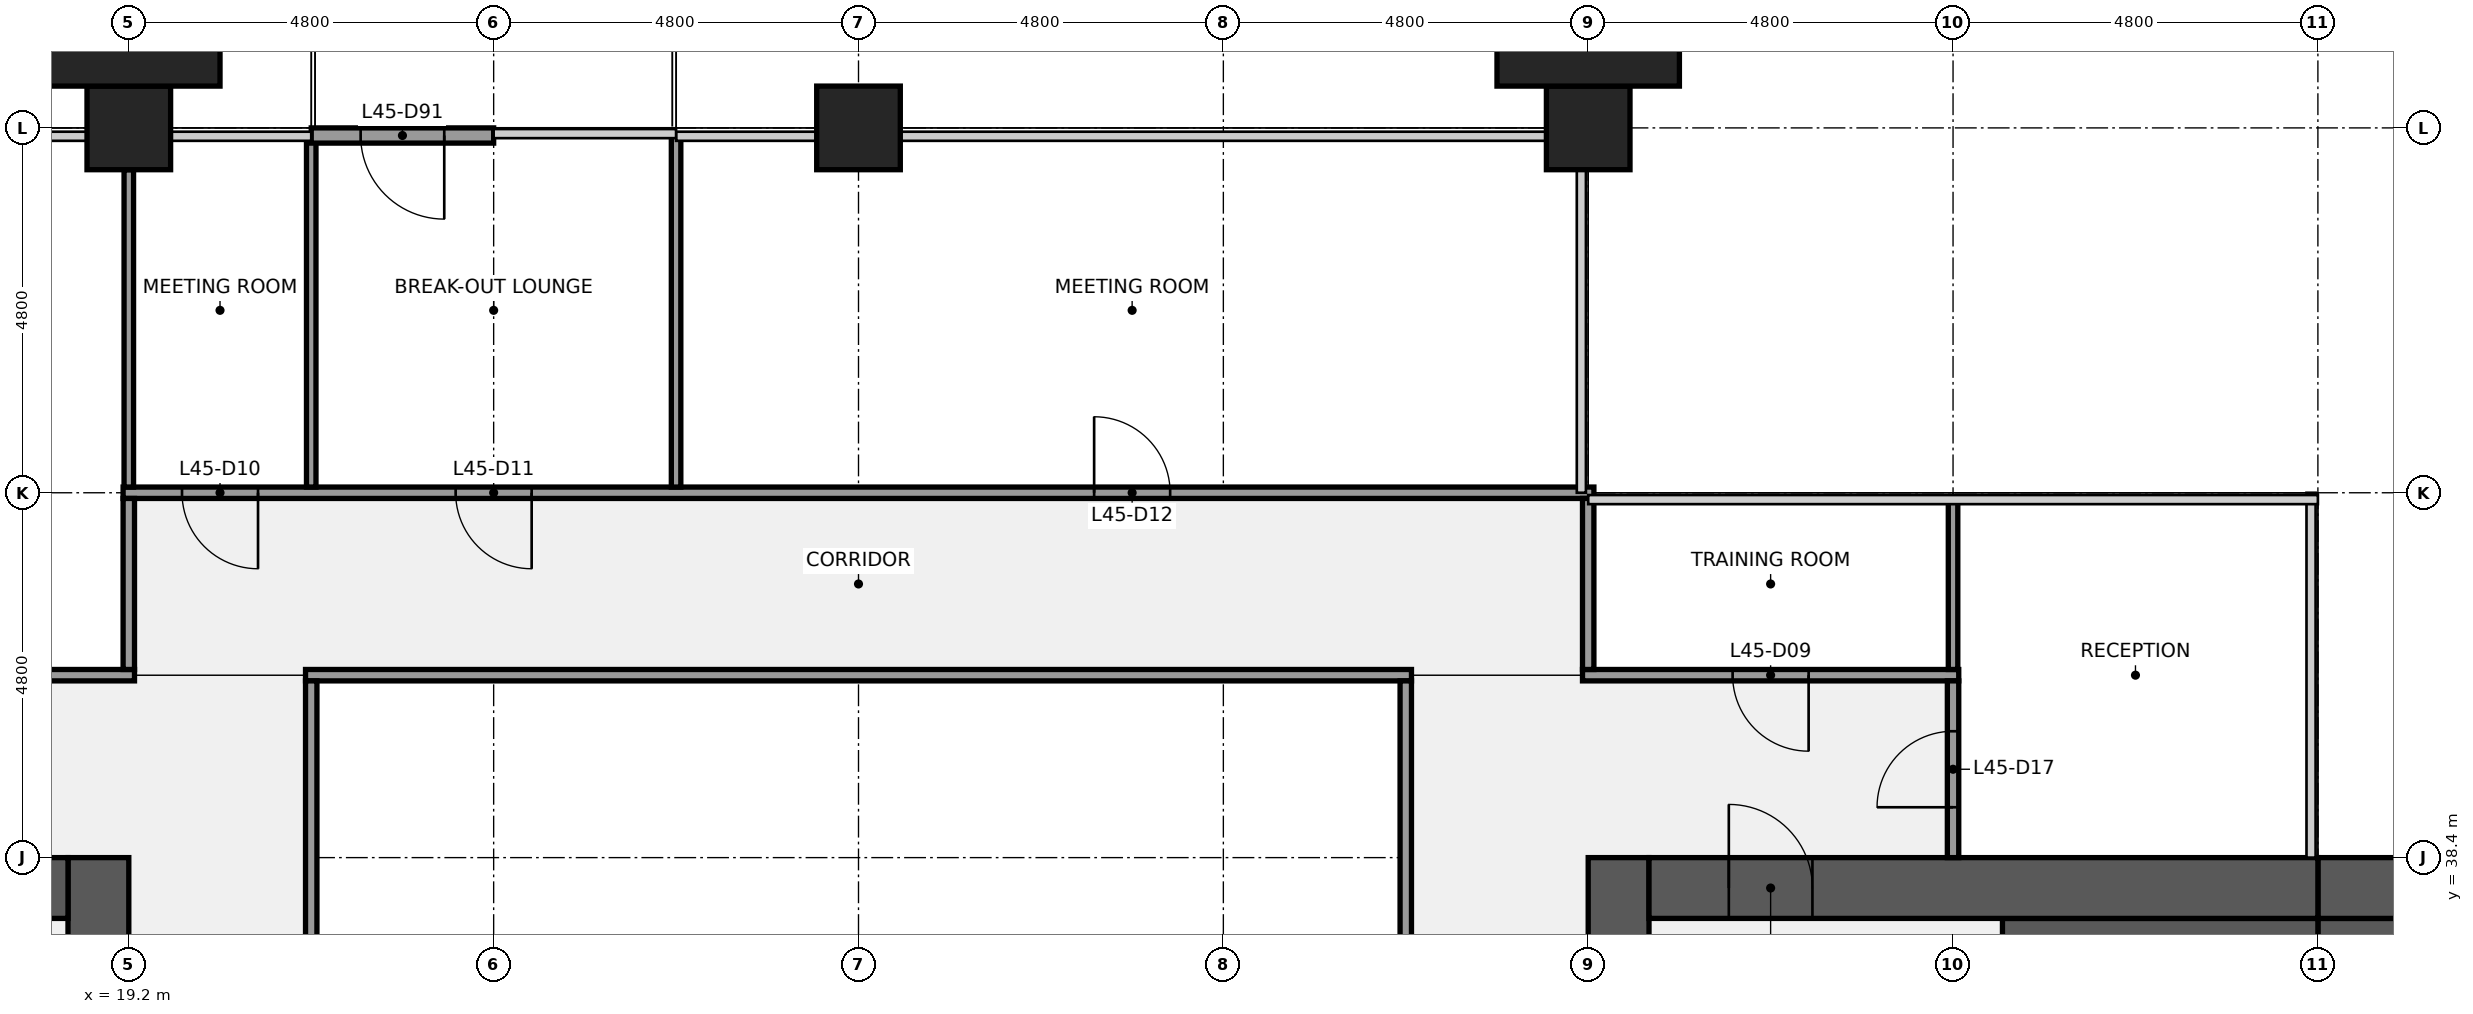
"""IFC4 building model, lengths in metres.
Left out: names, types, materials, properties, quantities, classifications, styles, units other than length and angle.
Written with IfcOpenShell. Run it as: python <this file> out.ifc"""

import sys

from ifc_helpers import new_model, si_unit, direction, frame, frame_2d, origin, origin_2d, place, context, subcontext, project, spatial, rectangle, extrude, element, fill, save


model = new_model("IFC4")
c1 = context("Model", 3, precision=1e-05, world=origin(), true_north=direction((0.0, 1.0)))
c2 = subcontext(c1, "Body", "Model", "MODEL_VIEW")
j1 = project(units=[si_unit("LENGTHUNIT", "METRE"), si_unit("PLANEANGLEUNIT", "RADIAN")], contexts=[c1])
p1 = place(None, origin())
s1 = spatial("IfcSite", under=j1, at=p1, CompositionType="ELEMENT")
p2 = place(p1, origin())
s2 = spatial("IfcBuilding", under=s1, at=p2, CompositionType="ELEMENT")
p3 = place(p2, frame((0.0, 0.0, 209.2)))
s3 = spatial("IfcBuildingStorey", under=s2, at=p3, CompositionType="ELEMENT", Elevation=209.2)
for number, where, z_axis, x_axis in (
    (1, (19.2, 48.0, 0.0), (0.0, 0.0, 1.0), (1.0, 0.0, 0.0)),
    (2, (28.8, 48.0, 0.0), (0.0, 0.0, 1.0), (1.0, 0.0, 0.0)),
    (3, (38.4, 48.0, 0.0), (0.0, 0.0, 1.0), (1.0, 0.0, 0.0)),
):
    element("IfcColumn", number, at=place(p3, frame(where, z_axis=z_axis, x_axis=x_axis)), inside=s3, PredefinedType="COLUMN", context=c2, shape_type="SweptSolid", body=[
        extrude(rectangle(XDim=1.1, YDim=1.1, at=origin_2d()), origin(), (0.0, 0.0, 1.0), 4.0),
    ])
p4 = place(p3, frame((18.8, 38.4, 0.0), z_axis=(0.0, 0.0, 1.0), x_axis=(0.0, -1.0, 0.0)))
e4 = element("IfcWall", 4, at=p4, inside=s3, PredefinedType="SHEAR", context=c2, shape_type="SweptSolid", body=[
    extrude(rectangle(XDim=28.8, YDim=0.8, at=frame_2d((14.4, 0.0))), origin(), (0.0, 0.0, 1.0), 3.84),
])
p5 = place(p4, frame((18.3, 0.0, 0.0)))
e5 = element("IfcOpeningElement", 5, at=p5, cuts=e4, PredefinedType="OPENING", context=c2, shape_type="SweptSolid", body=[
    extrude(rectangle(XDim=1.8, YDim=2.1, at=frame_2d((0.9, 1.05))), frame((0.0, 0.41, 0.0), z_axis=(0.0, -1.0, 0.0), x_axis=(1.0, 0.0, 0.0)), (0.0, 0.0, 1.0), 0.82),
])
p6 = place(p4, frame((8.7, 0.0, 0.0)))
e6 = element("IfcOpeningElement", 6, at=p6, cuts=e4, PredefinedType="OPENING", context=c2, shape_type="SweptSolid", body=[
    extrude(rectangle(XDim=1.8, YDim=2.1, at=frame_2d((0.9, 1.05))), frame((0.0, 0.41, 0.0), z_axis=(0.0, -1.0, 0.0), x_axis=(1.0, 0.0, 0.0)), (0.0, 0.0, 1.0), 0.82),
])
p7 = place(p3, frame((9.6, 38.0, 0.0), z_axis=(0.0, 0.0, 1.0), x_axis=(1.0, 0.0, 0.0)))
e7 = element("IfcWall", 7, at=p7, inside=s3, PredefinedType="SHEAR", context=c2, shape_type="SweptSolid", body=[
    extrude(rectangle(XDim=8.8, YDim=0.8, at=frame_2d((4.4, 0.0))), origin(), (0.0, 0.0, 1.0), 3.84),
])
p8 = place(p7, frame((6.65, 0.0, 0.0)))
e8 = element("IfcOpeningElement", 8, at=p8, cuts=e7, PredefinedType="OPENING", context=c2, shape_type="SweptSolid", body=[
    extrude(rectangle(XDim=1.1, YDim=2.1, at=frame_2d((0.55, 1.05))), frame((0.0, 0.41, 0.0), z_axis=(0.0, -1.0, 0.0), x_axis=(1.0, 0.0, 0.0)), (0.0, 0.0, 1.0), 0.82),
])
p9 = place(p3, frame((38.8, 9.6, 0.0), z_axis=(0.0, 0.0, 1.0), x_axis=(0.0, 1.0, 0.0)))
e9 = element("IfcWall", 9, at=p9, inside=s3, PredefinedType="SHEAR", context=c2, shape_type="SweptSolid", body=[
    extrude(rectangle(XDim=28.8, YDim=0.8, at=frame_2d((14.4, 0.0))), origin(), (0.0, 0.0, 1.0), 3.84),
])
p10 = place(p9, frame((8.7, 0.0, 0.0)))
e10 = element("IfcOpeningElement", 10, at=p10, cuts=e9, PredefinedType="OPENING", context=c2, shape_type="SweptSolid", body=[
    extrude(rectangle(XDim=1.8, YDim=2.1, at=frame_2d((0.9, 1.05))), frame((0.0, 0.41, 0.0), z_axis=(0.0, -1.0, 0.0), x_axis=(1.0, 0.0, 0.0)), (0.0, 0.0, 1.0), 0.82),
])
p11 = place(p9, frame((18.3, 0.0, 0.0)))
e11 = element("IfcOpeningElement", 11, at=p11, cuts=e9, PredefinedType="OPENING", context=c2, shape_type="SweptSolid", body=[
    extrude(rectangle(XDim=1.8, YDim=2.1, at=frame_2d((0.9, 1.05))), frame((0.0, 0.41, 0.0), z_axis=(0.0, -1.0, 0.0), x_axis=(1.0, 0.0, 0.0)), (0.0, 0.0, 1.0), 0.82),
])
p12 = place(p3, frame((48.0, 37.4, 0.0), z_axis=(0.0, 0.0, 1.0), x_axis=(1.0, 0.0, 0.0)))
e12 = element("IfcWall", 12, at=p12, inside=s3, PredefinedType="SHEAR", context=c2, shape_type="SweptSolid", body=[
    extrude(rectangle(XDim=3.35, YDim=0.4, at=frame_2d((1.675, 0.0))), origin(), (0.0, 0.0, 1.0), 3.84),
])
p13 = place(p3, frame((43.85, 37.4, 0.0), z_axis=(0.0, 0.0, 1.0), x_axis=(1.0, 0.0, 0.0)))
e13 = element("IfcWall", 13, at=p13, inside=s3, PredefinedType="SHEAR", context=c2, shape_type="SweptSolid", body=[
    extrude(rectangle(XDim=4.15, YDim=0.4, at=frame_2d((2.075, 0.0))), origin(), (0.0, 0.0, 1.0), 3.84),
])
p14 = place(p3, frame((48.0, 38.0, 0.0), z_axis=(0.0, 0.0, 1.0), x_axis=(1.0, 0.0, 0.0)))
e14 = element("IfcWall", 14, at=p14, inside=s3, PredefinedType="SHEAR", context=c2, shape_type="SweptSolid", body=[
    extrude(rectangle(XDim=8.8, YDim=0.8, at=frame_2d((4.4, 0.0))), origin(), (0.0, 0.0, 1.0), 3.84),
])
p15 = place(p14, frame((1.5, 0.0, 0.9)))
e15 = element("IfcOpeningElement", 15, at=p15, cuts=e14, PredefinedType="OPENING", context=c2, shape_type="SweptSolid", body=[
    extrude(rectangle(XDim=1.8, YDim=1.5, at=frame_2d((0.9, 0.75))), frame((0.0, 0.41, 0.0), z_axis=(0.0, -1.0, 0.0), x_axis=(1.0, 0.0, 0.0)), (0.0, 0.0, 1.0), 0.82),
])
p16 = place(p3, frame((39.2, 38.0, 0.0), z_axis=(0.0, 0.0, 1.0), x_axis=(1.0, 0.0, 0.0)))
e16 = element("IfcWall", 16, at=p16, inside=s3, PredefinedType="SHEAR", context=c2, shape_type="SweptSolid", body=[
    extrude(rectangle(XDim=8.8, YDim=0.8, at=frame_2d((4.4, 0.0))), origin(), (0.0, 0.0, 1.0), 3.84),
])
p17 = place(p16, frame((1.05, 0.0, 0.0)))
e17 = element("IfcOpeningElement", 17, at=p17, cuts=e16, PredefinedType="OPENING", context=c2, shape_type="SweptSolid", body=[
    extrude(rectangle(XDim=1.1, YDim=2.1, at=frame_2d((0.55, 1.05))), frame((0.0, 0.41, 0.0), z_axis=(0.0, -1.0, 0.0), x_axis=(1.0, 0.0, 0.0)), (0.0, 0.0, 1.0), 0.82),
])
p18 = place(p3, frame((14.325, 40.8, 0.0), z_axis=(0.0, 0.0, 1.0), x_axis=(1.0, 0.0, 0.0)))
e18 = element("IfcWall", 18, at=p18, inside=s3, PredefinedType="PARTITIONING", context=c2, shape_type="SweptSolid", body=[
    extrude(rectangle(XDim=4.95, YDim=0.15, at=frame_2d((2.475, 0.0))), origin(), (0.0, 0.0, 1.0), 2.87),
])
p19 = place(p18, frame((1.975, 0.0, 0.0)))
e19 = element("IfcOpeningElement", 19, at=p19, cuts=e18, PredefinedType="OPENING", context=c2, shape_type="SweptSolid", body=[
    extrude(rectangle(XDim=1.0, YDim=2.1, at=frame_2d((0.5, 1.05))), frame((0.0, 0.085, 0.0), z_axis=(0.0, -1.0, 0.0), x_axis=(1.0, 0.0, 0.0)), (0.0, 0.0, 1.0), 0.17),
])
p20 = place(p3, frame((21.525, 40.8, 0.0), z_axis=(0.0, 0.0, 1.0), x_axis=(1.0, 0.0, 0.0)))
e20 = element("IfcWall", 20, at=p20, inside=s3, PredefinedType="PARTITIONING", context=c2, shape_type="SweptSolid", body=[
    extrude(rectangle(XDim=14.55, YDim=0.15, at=frame_2d((7.275, 0.0))), origin(), (0.0, 0.0, 1.0), 2.87),
])
p21 = place(p3, frame((38.325, 40.8, 0.0), z_axis=(0.0, 0.0, 1.0), x_axis=(1.0, 0.0, 0.0)))
e21 = element("IfcWall", 21, at=p21, inside=s3, PredefinedType="PARTITIONING", context=c2, shape_type="SweptSolid", body=[
    extrude(rectangle(XDim=4.95, YDim=0.15, at=frame_2d((2.475, 0.0))), origin(), (0.0, 0.0, 1.0), 2.87),
])
p22 = place(p21, frame((1.975, 0.0, 0.0)))
e22 = element("IfcOpeningElement", 22, at=p22, cuts=e21, PredefinedType="OPENING", context=c2, shape_type="SweptSolid", body=[
    extrude(rectangle(XDim=1.0, YDim=2.1, at=frame_2d((0.5, 1.05))), frame((0.0, 0.085, 0.0), z_axis=(0.0, -1.0, 0.0), x_axis=(1.0, 0.0, 0.0)), (0.0, 0.0, 1.0), 0.17),
])
p23 = place(p3, frame((19.125, 43.2, 0.0), z_axis=(0.0, 0.0, 1.0), x_axis=(1.0, 0.0, 0.0)))
e23 = element("IfcWall", 23, at=p23, inside=s3, PredefinedType="PARTITIONING", context=c2, shape_type="SweptSolid", body=[
    extrude(rectangle(XDim=19.35, YDim=0.15, at=frame_2d((9.675, 0.0))), origin(), (0.0, 0.0, 1.0), 2.87),
])
p24 = place(p23, frame((0.775, 0.0, 0.0)))
e24 = element("IfcOpeningElement", 24, at=p24, cuts=e23, PredefinedType="OPENING", context=c2, shape_type="SweptSolid", body=[
    extrude(rectangle(XDim=1.0, YDim=2.1, at=frame_2d((0.5, 1.05))), frame((0.0, 0.085, 0.0), z_axis=(0.0, -1.0, 0.0), x_axis=(1.0, 0.0, 0.0)), (0.0, 0.0, 1.0), 0.17),
])
p25 = place(p23, frame((4.375, 0.0, 0.0)))
e25 = element("IfcOpeningElement", 25, at=p25, cuts=e23, PredefinedType="OPENING", context=c2, shape_type="SweptSolid", body=[
    extrude(rectangle(XDim=1.0, YDim=2.1, at=frame_2d((0.5, 1.05))), frame((0.0, 0.085, 0.0), z_axis=(0.0, -1.0, 0.0), x_axis=(1.0, 0.0, 0.0)), (0.0, 0.0, 1.0), 0.17),
])
p26 = place(p23, frame((12.775, 0.0, 0.0)))
e26 = element("IfcOpeningElement", 26, at=p26, cuts=e23, PredefinedType="OPENING", context=c2, shape_type="SweptSolid", body=[
    extrude(rectangle(XDim=1.0, YDim=2.1, at=frame_2d((0.5, 1.05))), frame((0.0, 0.085, 0.0), z_axis=(0.0, -1.0, 0.0), x_axis=(1.0, 0.0, 0.0)), (0.0, 0.0, 1.0), 0.17),
])
p27 = place(p3, frame((19.2, 43.275, 0.0), z_axis=(0.0, 0.0, 1.0), x_axis=(0.0, 1.0, 0.0)))
e27 = element("IfcWall", 27, at=p27, inside=s3, PredefinedType="PARTITIONING", context=c2, shape_type="SweptSolid", body=[
    extrude(rectangle(XDim=4.175, YDim=0.125, at=frame_2d((2.087, 0.0))), origin(), (0.0, 0.0, 1.0), 2.87),
])
p28 = place(p3, frame((19.2, 40.875, 0.0), z_axis=(0.0, 0.0, 1.0), x_axis=(0.0, 1.0, 0.0)))
e28 = element("IfcWall", 28, at=p28, inside=s3, PredefinedType="PARTITIONING", context=c2, shape_type="SweptSolid", body=[
    extrude(rectangle(XDim=2.25, YDim=0.15, at=frame_2d((1.125, 0.0))), origin(), (0.0, 0.0, 1.0), 2.87),
])
p29 = place(p3, frame((21.6, 43.275, 0.0), z_axis=(0.0, 0.0, 1.0), x_axis=(0.0, 1.0, 0.0)))
e29 = element("IfcWall", 29, at=p29, inside=s3, PredefinedType="PARTITIONING", context=c2, shape_type="SweptSolid", body=[
    extrude(rectangle(XDim=4.625, YDim=0.125, at=frame_2d((2.312, 0.0))), origin(), (0.0, 0.0, 1.0), 2.87),
])
p30 = place(p3, frame((21.6, 21.663, 0.0), z_axis=(0.0, 0.0, 1.0), x_axis=(0.0, 1.0, 0.0)))
e30 = element("IfcWall", 30, at=p30, inside=s3, PredefinedType="PARTITIONING", context=c2, shape_type="SweptSolid", body=[
    extrude(rectangle(XDim=19.062, YDim=0.15, at=frame_2d((9.531, 0.0))), origin(), (0.0, 0.0, 1.0), 2.87),
])
p31 = place(p30, frame((9.031, 0.0, 0.0)))
e31 = element("IfcOpeningElement", 31, at=p31, cuts=e30, PredefinedType="OPENING", context=c2, shape_type="SweptSolid", body=[
    extrude(rectangle(XDim=1.0, YDim=2.1, at=frame_2d((0.5, 1.05))), frame((0.0, 0.085, 0.0), z_axis=(0.0, -1.0, 0.0), x_axis=(1.0, 0.0, 0.0)), (0.0, 0.0, 1.0), 0.17),
])
p32 = place(p3, frame((26.4, 43.275, 0.0), z_axis=(0.0, 0.0, 1.0), x_axis=(0.0, 1.0, 0.0)))
e32 = element("IfcWall", 32, at=p32, inside=s3, PredefinedType="PARTITIONING", context=c2, shape_type="SweptSolid", body=[
    extrude(rectangle(XDim=4.625, YDim=0.125, at=frame_2d((2.312, 0.0))), origin(), (0.0, 0.0, 1.0), 2.87),
])
p33 = place(p3, frame((36.0, 21.663, 0.0), z_axis=(0.0, 0.0, 1.0), x_axis=(0.0, 1.0, 0.0)))
e33 = element("IfcWall", 33, at=p33, inside=s3, PredefinedType="PARTITIONING", context=c2, shape_type="SweptSolid", body=[
    extrude(rectangle(XDim=19.062, YDim=0.15, at=frame_2d((9.531, 0.0))), origin(), (0.0, 0.0, 1.0), 2.87),
])
p34 = place(p3, frame((38.4, 40.875, 0.0), z_axis=(0.0, 0.0, 1.0), x_axis=(0.0, 1.0, 0.0)))
e34 = element("IfcWall", 34, at=p34, inside=s3, PredefinedType="PARTITIONING", context=c2, shape_type="SweptSolid", body=[
    extrude(rectangle(XDim=2.25, YDim=0.15, at=frame_2d((1.125, 0.0))), origin(), (0.0, 0.0, 1.0), 2.87),
])
p35 = place(p3, frame((43.2, 40.875, 0.0), z_axis=(0.0, 0.0, 1.0), x_axis=(0.0, 1.0, 0.0)))
e35 = element("IfcWall", 35, at=p35, inside=s3, PredefinedType="PARTITIONING", context=c2, shape_type="SweptSolid", body=[
    extrude(rectangle(XDim=2.225, YDim=0.125, at=frame_2d((1.113, 0.0))), origin(), (0.0, 0.0, 1.0), 2.87),
])
p36 = place(p3, frame((43.2, 38.4, 0.0), z_axis=(0.0, 0.0, 1.0), x_axis=(0.0, 1.0, 0.0)))
e36 = element("IfcWall", 36, at=p36, inside=s3, PredefinedType="PARTITIONING", context=c2, shape_type="SweptSolid", body=[
    extrude(rectangle(XDim=2.325, YDim=0.15, at=frame_2d((1.163, 0.0))), origin(), (0.0, 0.0, 1.0), 2.87),
])
p37 = place(p36, frame((0.663, 0.0, 0.0)))
e37 = element("IfcOpeningElement", 37, at=p37, cuts=e36, PredefinedType="OPENING", context=c2, shape_type="SweptSolid", body=[
    extrude(rectangle(XDim=1.0, YDim=2.1, at=frame_2d((0.5, 1.05))), frame((0.0, 0.085, 0.0), z_axis=(0.0, -1.0, 0.0), x_axis=(1.0, 0.0, 0.0)), (0.0, 0.0, 1.0), 0.17),
])
p38 = place(p3, frame((24.0, 47.9, 0.0), z_axis=(0.0, 0.0, 1.0), x_axis=(-1.0, 0.0, 0.0)))
e38 = element("IfcWall", 38, at=p38, inside=s3, PredefinedType="SOLIDWALL", context=c2, shape_type="SweptSolid", body=[
    extrude(rectangle(XDim=2.4, YDim=0.2, at=frame_2d((1.2, 0.0))), origin(), (0.0, 0.0, 1.0), 3.314),
])
p39 = place(p38, frame((0.65, 0.0, 0.0)))
e39 = element("IfcOpeningElement", 39, at=p39, cuts=e38, PredefinedType="OPENING", context=c2, shape_type="SweptSolid", body=[
    extrude(rectangle(XDim=1.1, YDim=2.1, at=frame_2d((0.55, 1.05))), frame((0.0, 0.11, 0.0), z_axis=(0.0, -1.0, 0.0), x_axis=(1.0, 0.0, 0.0)), (0.0, 0.0, 1.0), 0.22),
])
for number, where, z_axis, x_axis in (
    (40, (19.2, 49.025, 0.0), (0.0, 0.0, 1.0), (1.0, 0.0, 0.0)),
    (41, (38.4, 49.025, 0.0), (0.0, 0.0, 1.0), (1.0, 0.0, 0.0)),
):
    element("IfcColumn", number, at=place(p3, frame(where, z_axis=z_axis, x_axis=x_axis)), inside=s3, PredefinedType="PILASTER", context=c2, shape_type="SweptSolid", body=[
        extrude(rectangle(XDim=2.4, YDim=0.95, at=origin_2d()), origin(), (0.0, 0.0, 1.0), 4.0),
    ])
p40 = place(p17, origin())
e42 = element("IfcDoor", 42, at=p40, inside=s3, OperationType="SINGLE_SWING_LEFT", PredefinedType="DOOR", context=c2, shape_type="SweptSolid", body=[
    extrude(rectangle(XDim=1.1, YDim=2.1, at=frame_2d((0.55, 1.05))), frame((0.0, 0.025, 0.0), z_axis=(0.0, -1.0, 0.0), x_axis=(1.0, 0.0, 0.0)), (0.0, 0.0, 1.0), 0.05),
])
fill(e17, e42)
p41 = place(p22, origin())
e43 = element("IfcDoor", 43, at=p41, inside=s3, OperationType="SINGLE_SWING_RIGHT", PredefinedType="DOOR", context=c2, shape_type="SweptSolid", body=[
    extrude(rectangle(XDim=1.0, YDim=2.1, at=frame_2d((0.5, 1.05))), frame((0.0, 0.025, 0.0), z_axis=(0.0, -1.0, 0.0), x_axis=(1.0, 0.0, 0.0)), (0.0, 0.0, 1.0), 0.05),
])
fill(e22, e43)
p42 = place(p24, origin())
e44 = element("IfcDoor", 44, at=p42, inside=s3, OperationType="SINGLE_SWING_RIGHT", PredefinedType="DOOR", context=c2, shape_type="SweptSolid", body=[
    extrude(rectangle(XDim=1.0, YDim=2.1, at=frame_2d((0.5, 1.05))), frame((0.0, 0.025, 0.0), z_axis=(0.0, -1.0, 0.0), x_axis=(1.0, 0.0, 0.0)), (0.0, 0.0, 1.0), 0.05),
])
fill(e24, e44)
p43 = place(p25, origin())
e45 = element("IfcDoor", 45, at=p43, inside=s3, OperationType="SINGLE_SWING_RIGHT", PredefinedType="DOOR", context=c2, shape_type="SweptSolid", body=[
    extrude(rectangle(XDim=1.0, YDim=2.1, at=frame_2d((0.5, 1.05))), frame((0.0, 0.025, 0.0), z_axis=(0.0, -1.0, 0.0), x_axis=(1.0, 0.0, 0.0)), (0.0, 0.0, 1.0), 0.05),
])
fill(e25, e45)
p44 = place(p26, origin())
e46 = element("IfcDoor", 46, at=p44, inside=s3, OperationType="SINGLE_SWING_LEFT", PredefinedType="DOOR", context=c2, shape_type="SweptSolid", body=[
    extrude(rectangle(XDim=1.0, YDim=2.1, at=frame_2d((0.5, 1.05))), frame((0.0, 0.025, 0.0), z_axis=(0.0, -1.0, 0.0), x_axis=(1.0, 0.0, 0.0)), (0.0, 0.0, 1.0), 0.05),
])
fill(e26, e46)
p45 = place(p37, origin())
e47 = element("IfcDoor", 47, at=p45, inside=s3, OperationType="SINGLE_SWING_LEFT", PredefinedType="DOOR", context=c2, shape_type="SweptSolid", body=[
    extrude(rectangle(XDim=1.0, YDim=2.1, at=frame_2d((0.5, 1.05))), frame((0.0, 0.025, 0.0), z_axis=(0.0, -1.0, 0.0), x_axis=(1.0, 0.0, 0.0)), (0.0, 0.0, 1.0), 0.05),
])
fill(e37, e47)
p46 = place(p39, origin())
e48 = element("IfcDoor", 48, at=p46, inside=s3, OperationType="SINGLE_SWING_LEFT", PredefinedType="DOOR", context=c2, shape_type="SweptSolid", body=[
    extrude(rectangle(XDim=1.1, YDim=2.1, at=frame_2d((0.55, 1.05))), frame((0.0, 0.025, 0.0), z_axis=(0.0, -1.0, 0.0), x_axis=(1.0, 0.0, 0.0)), (0.0, 0.0, 1.0), 0.05),
])
fill(e39, e48)
save(model, sys.argv[1])
